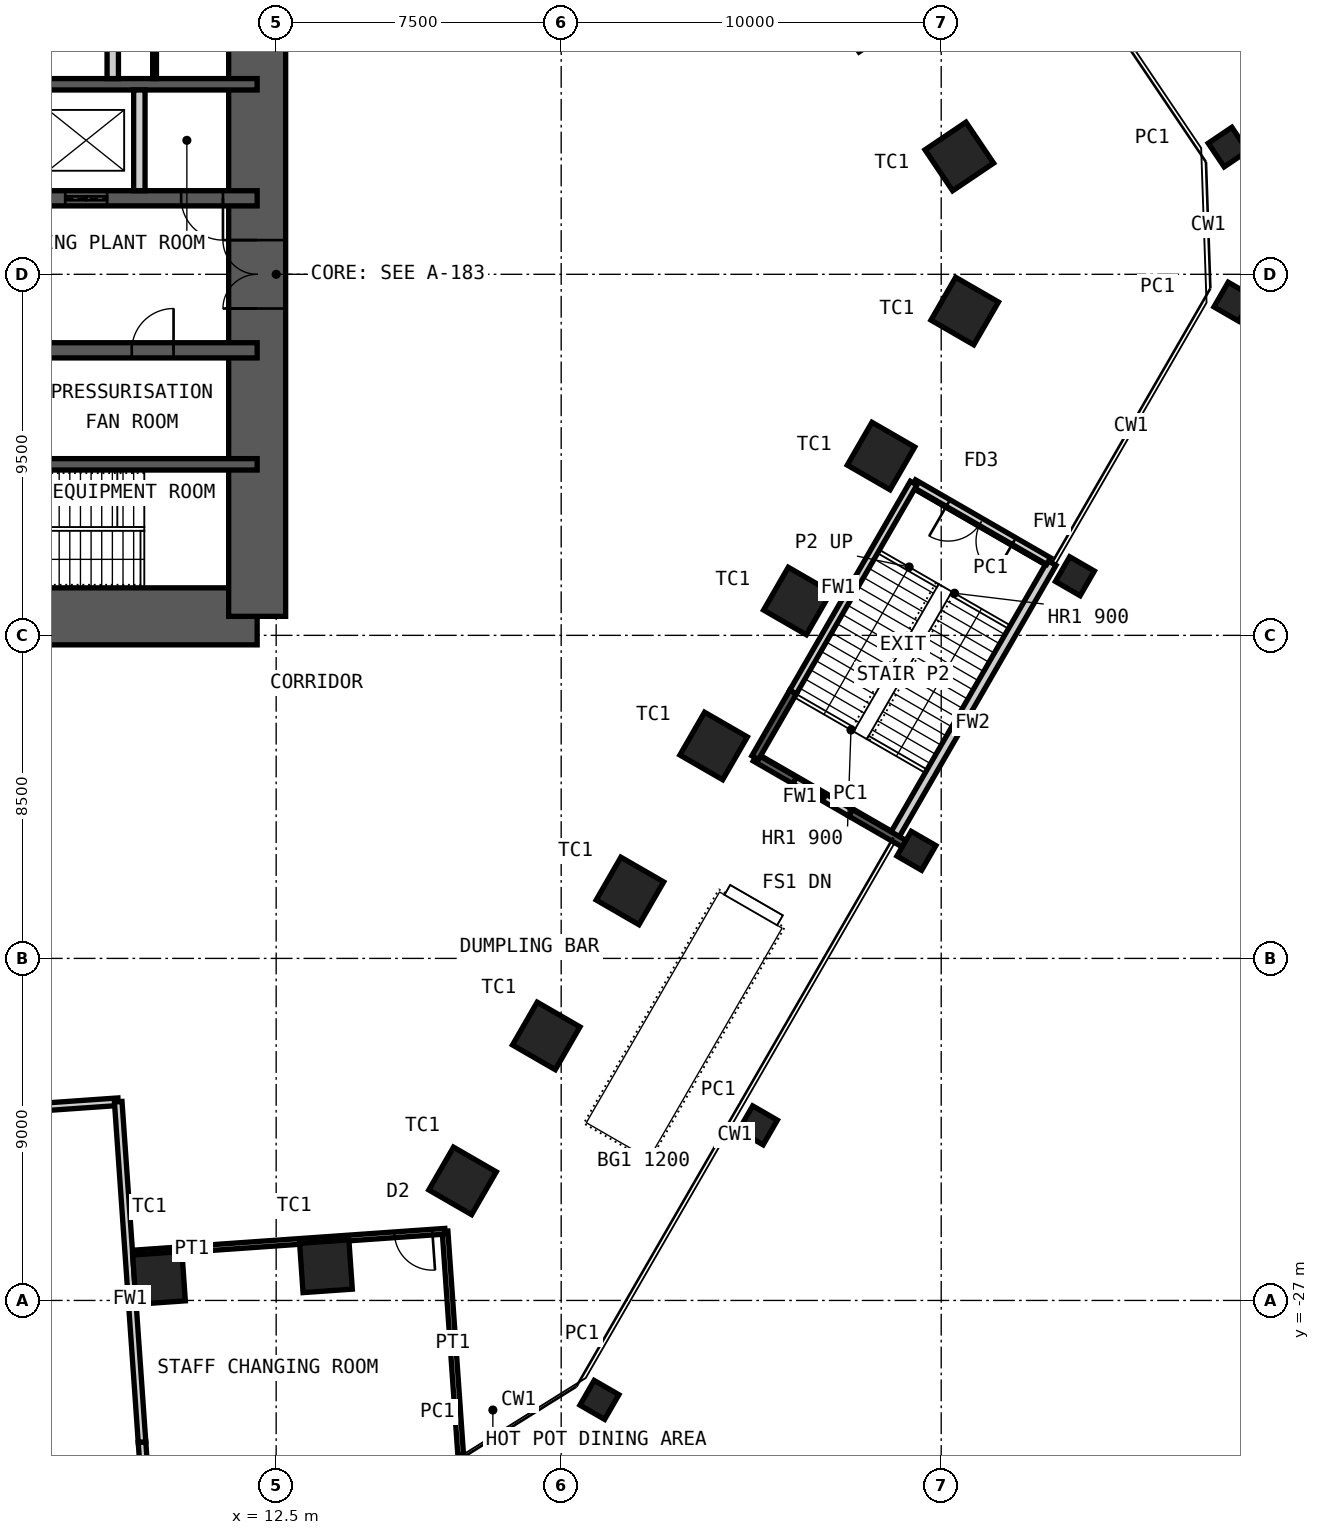
"""IFC4 building model, lengths in metres.
Left out: names, types, materials, properties, quantities, classifications, styles, units other than length and angle.
Written with IfcOpenShell. Run it as: python <this file> out.ifc"""

import sys

from ifc_helpers import new_model, si_unit, direction, frame, frame_2d, origin, origin_2d, place, context, subcontext, project, spatial, rectangle, hollow_rectangle, extrude, element, fill, save


model = new_model("IFC4")
c1 = context("Model", 3, precision=1e-05, world=origin(), true_north=direction((0.0, 1.0)))
c2 = subcontext(c1, "Body", "Model", "MODEL_VIEW")
j1 = project(units=[si_unit("LENGTHUNIT", "METRE"), si_unit("PLANEANGLEUNIT", "RADIAN")], contexts=[c1])
p1 = place(None, origin())
s1 = spatial("IfcSite", under=j1, at=p1, CompositionType="ELEMENT")
p2 = place(p1, origin())
s2 = spatial("IfcBuilding", under=s1, at=p2, CompositionType="ELEMENT")
p3 = place(p2, frame((0.0, 0.0, 6.0)))
s3 = spatial("IfcBuildingStorey", under=s2, at=p3, CompositionType="ELEMENT", Elevation=6.0)
for number, where, z_axis, x_axis in (
    (1, (28.013, 6.752, 0.0), (0.0, 0.0, 1.0), (-0.559, 0.829, 0.0)),
    (2, (30.476, 3.101, 0.0), (0.0, 0.0, 1.0), (-0.559, 0.829, 0.0)),
    (3, (30.618, -0.967, 0.0), (0.0, 0.0, 1.0), (0.5, 0.866, 0.0)),
    (4, (28.416, -4.782, 0.0), (0.0, 0.0, 1.0), (0.5, 0.866, 0.0)),
    (5, (26.214, -8.596, 0.0), (0.0, 0.0, 1.0), (0.5, 0.866, 0.0)),
    (6, (24.011, -12.411, 0.0), (0.0, 0.0, 1.0), (0.5, 0.866, 0.0)),
    (7, (21.809, -16.225, 0.0), (0.0, 0.0, 1.0), (0.5, 0.866, 0.0)),
    (8, (19.607, -20.04, 0.0), (0.0, 0.0, 1.0), (0.5, 0.866, 0.0)),
    (9, (17.405, -23.854, 0.0), (0.0, 0.0, 1.0), (0.5, 0.866, 0.0)),
    (10, (13.811, -26.1, 0.0), (0.0, 0.0, 1.0), (0.998, 0.07, 0.0)),
    (11, (9.417, -26.407, 0.0), (0.0, 0.0, 1.0), (0.998, 0.07, 0.0)),
):
    element("IfcColumn", number, at=place(p3, frame(where, z_axis=z_axis, x_axis=x_axis)), inside=s3, PredefinedType="COLUMN", context=c2, shape_type="SweptSolid", body=[
        extrude(hollow_rectangle(XDim=1.3, YDim=1.3, WallThickness=0.1, at=origin_2d()), origin(), (0.0, 0.0, 1.0), 6.0),
    ])
for number, where, z_axis, x_axis in (
    (12, (37.689, -0.72, 0.0), (0.0, 0.0, 1.0), (0.5, 0.866, 0.0)),
    (13, (33.518, -7.945, 0.0), (0.0, 0.0, 1.0), (0.5, 0.866, 0.0)),
    (14, (29.347, -15.169, 0.0), (0.0, 0.0, 1.0), (0.5, 0.866, 0.0)),
    (15, (25.177, -22.393, 0.0), (0.0, 0.0, 1.0), (0.5, 0.866, 0.0)),
    (16, (37.547, 3.348, 0.0), (0.0, 0.0, 1.0), (-0.559, 0.829, 0.0)),
    (17, (21.006, -29.617, 0.0), (0.0, 0.0, 1.0), (0.5, 0.866, 0.0)),
):
    element("IfcColumn", number, at=place(p3, frame(where, z_axis=z_axis, x_axis=x_axis)), inside=s3, PredefinedType="COLUMN", context=c2, shape_type="SweptSolid", body=[
        extrude(hollow_rectangle(XDim=0.75, YDim=0.75, WallThickness=0.036, at=origin_2d()), origin(), (0.0, 0.0, 1.0), 6.0),
    ])
p4 = place(p3, frame((-12.0, -9.0, 0.0), z_axis=(0.0, 0.0, 1.0), x_axis=(1.0, 0.0, 0.0)))
e18 = element("IfcWall", 18, at=p4, inside=s3, PredefinedType="SHEAR", context=c2, shape_type="SweptSolid", body=[
    extrude(rectangle(XDim=24.0, YDim=1.5, at=frame_2d((12.0, 0.0))), origin(), (0.0, 0.0, 1.0), 6.0),
])
p5 = place(p4, frame((1.35, 0.0, 0.0)))
e19 = element("IfcOpeningElement", 19, at=p5, cuts=e18, PredefinedType="OPENING", context=c2, shape_type="SweptSolid", body=[
    extrude(rectangle(XDim=1.0, YDim=2.1, at=frame_2d((0.5, 1.05))), frame((0.0, 0.76, 0.0), z_axis=(0.0, -1.0, 0.0), x_axis=(1.0, 0.0, 0.0)), (0.0, 0.0, 1.0), 1.52),
])
p6 = place(p4, frame((5.325, 0.0, 0.0)))
e20 = element("IfcOpeningElement", 20, at=p6, cuts=e18, PredefinedType="OPENING", context=c2, shape_type="SweptSolid", body=[
    extrude(rectangle(XDim=1.15, YDim=2.1, at=frame_2d((0.575, 1.05))), frame((0.0, 0.76, 0.0), z_axis=(0.0, -1.0, 0.0), x_axis=(1.0, 0.0, 0.0)), (0.0, 0.0, 1.0), 1.52),
])
p7 = place(p4, frame((12.6, 0.0, 0.0)))
e21 = element("IfcOpeningElement", 21, at=p7, cuts=e18, PredefinedType="OPENING", context=c2, shape_type="SweptSolid", body=[
    extrude(rectangle(XDim=1.0, YDim=2.1, at=frame_2d((0.5, 1.05))), frame((0.0, 0.76, 0.0), z_axis=(0.0, -1.0, 0.0), x_axis=(1.0, 0.0, 0.0)), (0.0, 0.0, 1.0), 1.52),
])
p8 = place(p3, frame((12.0, -9.0, 0.0), z_axis=(0.0, 0.0, 1.0), x_axis=(0.0, 1.0, 0.0)))
e22 = element("IfcWall", 22, at=p8, inside=s3, PredefinedType="SHEAR", context=c2, shape_type="SweptSolid", body=[
    extrude(rectangle(XDim=18.0, YDim=1.5, at=frame_2d((9.0, 0.0))), origin(), (0.0, 0.0, 1.0), 6.0),
])
p9 = place(p8, frame((8.1, 0.0, 0.0)))
e23 = element("IfcOpeningElement", 23, at=p9, cuts=e22, PredefinedType="OPENING", context=c2, shape_type="SweptSolid", body=[
    extrude(rectangle(XDim=1.8, YDim=2.1, at=frame_2d((0.9, 1.05))), frame((0.0, 0.76, 0.0), z_axis=(0.0, -1.0, 0.0), x_axis=(1.0, 0.0, 0.0)), (0.0, 0.0, 1.0), 1.52),
])
p10 = place(p3, frame((-12.0, 5.0, 0.0), z_axis=(0.0, 0.0, 1.0), x_axis=(1.0, 0.0, 0.0)))
e24 = element("IfcWall", 24, at=p10, inside=s3, PredefinedType="SHEAR", context=c2, shape_type="SweptSolid", body=[
    extrude(rectangle(XDim=24.0, YDim=0.3, at=frame_2d((12.0, 0.0))), origin(), (0.0, 0.0, 1.0), 6.0),
])
p11 = place(p3, frame((-12.0, 2.0, 0.0), z_axis=(0.0, 0.0, 1.0), x_axis=(1.0, 0.0, 0.0)))
e25 = element("IfcWall", 25, at=p11, inside=s3, PredefinedType="SHEAR", context=c2, shape_type="SweptSolid", body=[
    extrude(rectangle(XDim=24.0, YDim=0.4, at=frame_2d((12.0, 0.0))), origin(), (0.0, 0.0, 1.0), 6.0),
])
p12 = place(p11, frame((2.4, 0.0, 0.0)))
e26 = element("IfcOpeningElement", 26, at=p12, cuts=e25, PredefinedType="OPENING", context=c2, shape_type="SweptSolid", body=[
    extrude(rectangle(XDim=1.1, YDim=2.1, at=frame_2d((0.55, 1.05))), frame((0.0, 0.21, 0.0), z_axis=(0.0, -1.0, 0.0), x_axis=(1.0, 0.0, 0.0)), (0.0, 0.0, 1.0), 0.42),
])
p13 = place(p11, frame((22.0, 0.0, 0.0)))
e27 = element("IfcOpeningElement", 27, at=p13, cuts=e25, PredefinedType="OPENING", context=c2, shape_type="SweptSolid", body=[
    extrude(rectangle(XDim=1.1, YDim=2.1, at=frame_2d((0.55, 1.05))), frame((0.0, 0.21, 0.0), z_axis=(0.0, -1.0, 0.0), x_axis=(1.0, 0.0, 0.0)), (0.0, 0.0, 1.0), 0.42),
])
p14 = place(p11, frame((10.15, 0.0, 0.0)))
e28 = element("IfcOpeningElement", 28, at=p14, cuts=e25, PredefinedType="OPENING", context=c2, shape_type="SweptSolid", body=[
    extrude(rectangle(XDim=1.0, YDim=2.1, at=frame_2d((0.5, 1.05))), frame((0.0, 0.21, 0.0), z_axis=(0.0, -1.0, 0.0), x_axis=(1.0, 0.0, 0.0)), (0.0, 0.0, 1.0), 0.42),
])
p15 = place(p11, frame((6.7, 0.0, 0.0)))
e29 = element("IfcOpeningElement", 29, at=p15, cuts=e25, PredefinedType="OPENING", context=c2, shape_type="SweptSolid", body=[
    extrude(rectangle(XDim=1.4, YDim=2.4, at=frame_2d((0.7, 1.2))), frame((0.0, 0.21, 0.0), z_axis=(0.0, -1.0, 0.0), x_axis=(1.0, 0.0, 0.0)), (0.0, 0.0, 1.0), 0.42),
])
p16 = place(p11, frame((13.35, 0.0, 0.0)))
e30 = element("IfcOpeningElement", 30, at=p16, cuts=e25, PredefinedType="OPENING", context=c2, shape_type="SweptSolid", body=[
    extrude(rectangle(XDim=1.1, YDim=2.4, at=frame_2d((0.55, 1.2))), frame((0.0, 0.21, 0.0), z_axis=(0.0, -1.0, 0.0), x_axis=(1.0, 0.0, 0.0)), (0.0, 0.0, 1.0), 0.42),
])
p17 = place(p11, frame((16.15, 0.0, 0.0)))
e31 = element("IfcOpeningElement", 31, at=p17, cuts=e25, PredefinedType="OPENING", context=c2, shape_type="SweptSolid", body=[
    extrude(rectangle(XDim=1.1, YDim=2.4, at=frame_2d((0.55, 1.2))), frame((0.0, 0.21, 0.0), z_axis=(0.0, -1.0, 0.0), x_axis=(1.0, 0.0, 0.0)), (0.0, 0.0, 1.0), 0.42),
])
p18 = place(p11, frame((18.95, 0.0, 0.0)))
e32 = element("IfcOpeningElement", 32, at=p18, cuts=e25, PredefinedType="OPENING", context=c2, shape_type="SweptSolid", body=[
    extrude(rectangle(XDim=1.1, YDim=2.4, at=frame_2d((0.55, 1.2))), frame((0.0, 0.21, 0.0), z_axis=(0.0, -1.0, 0.0), x_axis=(1.0, 0.0, 0.0)), (0.0, 0.0, 1.0), 0.42),
])
p19 = place(p3, frame((-12.0, -2.0, 0.0), z_axis=(0.0, 0.0, 1.0), x_axis=(1.0, 0.0, 0.0)))
e33 = element("IfcWall", 33, at=p19, inside=s3, PredefinedType="SHEAR", context=c2, shape_type="SweptSolid", body=[
    extrude(rectangle(XDim=24.0, YDim=0.4, at=frame_2d((12.0, 0.0))), origin(), (0.0, 0.0, 1.0), 6.0),
])
p20 = place(p19, frame((1.1, 0.0, 0.0)))
e34 = element("IfcOpeningElement", 34, at=p20, cuts=e33, PredefinedType="OPENING", context=c2, shape_type="SweptSolid", body=[
    extrude(rectangle(XDim=1.1, YDim=2.1, at=frame_2d((0.55, 1.05))), frame((0.0, 0.21, 0.0), z_axis=(0.0, -1.0, 0.0), x_axis=(1.0, 0.0, 0.0)), (0.0, 0.0, 1.0), 0.42),
])
p21 = place(p19, frame((13.55, 0.0, 0.0)))
e35 = element("IfcOpeningElement", 35, at=p21, cuts=e33, PredefinedType="OPENING", context=c2, shape_type="SweptSolid", body=[
    extrude(rectangle(XDim=1.1, YDim=2.1, at=frame_2d((0.55, 1.05))), frame((0.0, 0.21, 0.0), z_axis=(0.0, -1.0, 0.0), x_axis=(1.0, 0.0, 0.0)), (0.0, 0.0, 1.0), 0.42),
])
p22 = place(p19, frame((20.7, 0.0, 0.0)))
e36 = element("IfcOpeningElement", 36, at=p22, cuts=e33, PredefinedType="OPENING", context=c2, shape_type="SweptSolid", body=[
    extrude(rectangle(XDim=1.1, YDim=2.1, at=frame_2d((0.55, 1.05))), frame((0.0, 0.21, 0.0), z_axis=(0.0, -1.0, 0.0), x_axis=(1.0, 0.0, 0.0)), (0.0, 0.0, 1.0), 0.42),
])
p23 = place(p3, frame((-12.0, -5.0, 0.0), z_axis=(0.0, 0.0, 1.0), x_axis=(1.0, 0.0, 0.0)))
e37 = element("IfcWall", 37, at=p23, inside=s3, PredefinedType="SHEAR", context=c2, shape_type="SweptSolid", body=[
    extrude(rectangle(XDim=24.0, YDim=0.3, at=frame_2d((12.0, 0.0))), origin(), (0.0, 0.0, 1.0), 6.0),
])
p24 = place(p3, frame((8.2, 5.15, 0.0), z_axis=(0.0, 0.0, 1.0), x_axis=(0.0, 1.0, 0.0)))
e38 = element("IfcWall", 38, at=p24, inside=s3, PredefinedType="PARTITIONING", context=c2, shape_type="SweptSolid", body=[
    extrude(rectangle(XDim=3.85, YDim=0.3, at=frame_2d((1.925, 0.0))), origin(), (0.0, 0.0, 1.0), 5.78),
])
p25 = place(p3, frame((8.9, 2.2, 0.0), z_axis=(0.0, 0.0, 1.0), x_axis=(0.0, 1.0, 0.0)))
e39 = element("IfcWall", 39, at=p25, inside=s3, PredefinedType="PARTITIONING", context=c2, shape_type="SweptSolid", body=[
    extrude(rectangle(XDim=2.65, YDim=0.3, at=frame_2d((1.325, 0.0))), origin(), (0.0, 0.0, 1.0), 5.78),
])
p26 = place(p3, frame((32.912, -7.595, 0.0), z_axis=(0.0, 0.0, 1.0), x_axis=(-0.500004511595, -0.866022798998, 0.0)))
e40 = element("IfcWall", 40, at=p26, inside=s3, PredefinedType="SOLIDWALL", context=c2, shape_type="SweptSolid", body=[
    extrude(rectangle(XDim=8.342, YDim=0.25, at=frame_2d((4.171, 0.0))), origin(), (0.0, 0.0, 1.0), 5.75),
])
p27 = place(p3, frame((9.3, 5.15, 0.0), z_axis=(0.0, 0.0, 1.0), x_axis=(0.0, 1.0, 0.0)))
e41 = element("IfcWall", 41, at=p27, inside=s3, PredefinedType="PARTITIONING", context=c2, shape_type="SweptSolid", body=[
    extrude(rectangle(XDim=1.5, YDim=0.1, at=frame_2d((0.75, 0.0))), origin(), (0.0, 0.0, 1.0), 2.1),
])
p28 = place(p3, frame((9.034, -31.647, 0.0), z_axis=(0.0, 0.0, 1.0), x_axis=(-0.069837025026, 0.997558414297, 0.0)))
e42 = element("IfcWall", 42, at=p28, inside=s3, PredefinedType="PARTITIONING", context=c2, shape_type="SweptSolid", body=[
    extrude(rectangle(XDim=0.923, YDim=0.2, at=frame_2d((0.461, 0.0))), origin(), (0.0, 0.0, 1.0), 4.65),
])
p29 = place(p3, frame((8.344, -21.771, 0.0), z_axis=(0.0, 0.0, 1.0), x_axis=(-0.997563959397, -0.069757773133, 0.0)))
e43 = element("IfcWall", 43, at=p29, inside=s3, PredefinedType="PARTITIONING", context=c2, shape_type="SweptSolid", body=[
    extrude(rectangle(XDim=16.684, YDim=0.2, at=frame_2d((8.342, 0.0))), origin(), (0.0, 0.0, 1.0), 5.75),
])
p30 = place(p29, frame((7.342, 0.0, 0.0)))
e44 = element("IfcOpeningElement", 44, at=p30, cuts=e43, PredefinedType="OPENING", context=c2, shape_type="SweptSolid", body=[
    extrude(rectangle(XDim=2.0, YDim=2.4, at=frame_2d((1.0, 1.2))), frame((0.0, 0.11, 0.0), z_axis=(0.0, -1.0, 0.0), x_axis=(1.0, 0.0, 0.0)), (0.0, 0.0, 1.0), 0.22),
])
p31 = place(p3, frame((17.356, -31.065, 0.0), z_axis=(0.0, 0.0, 1.0), x_axis=(-0.069767771051, 0.997563260211, 0.0)))
e45 = element("IfcWall", 45, at=p31, inside=s3, PredefinedType="PARTITIONING", context=c2, shape_type="SweptSolid", body=[
    extrude(rectangle(XDim=5.9, YDim=0.15, at=frame_2d((2.95, 0.0))), origin(), (0.0, 0.0, 1.0), 5.75),
])
p32 = place(p3, frame((16.944, -25.179, 0.0), z_axis=(0.0, 0.0, 1.0), x_axis=(-0.997564977604, -0.069743210844, 0.0)))
e46 = element("IfcWall", 46, at=p32, inside=s3, PredefinedType="PARTITIONING", context=c2, shape_type="SweptSolid", body=[
    extrude(rectangle(XDim=8.342, YDim=0.15, at=frame_2d((4.171, 0.0))), origin(), (0.0, 0.0, 1.0), 5.75),
])
p33 = place(p32, frame((0.334, 0.0, 0.0)))
e47 = element("IfcOpeningElement", 47, at=p33, cuts=e46, PredefinedType="OPENING", context=c2, shape_type="SweptSolid", body=[
    extrude(rectangle(XDim=1.0, YDim=2.4, at=frame_2d((0.5, 1.2))), frame((0.0, 0.085, 0.0), z_axis=(0.0, -1.0, 0.0), x_axis=(1.0, 0.0, 0.0)), (0.0, 0.0, 1.0), 0.17),
])
p34 = place(p3, frame((32.825, -7.545, 0.0), z_axis=(0.0, 0.0, 1.0), x_axis=(-0.8660249478, 0.500000789788, 0.0)))
e48 = element("IfcWall", 48, at=p34, inside=s3, PredefinedType="PARTITIONING", context=c2, shape_type="SweptSolid", body=[
    extrude(rectangle(XDim=4.1, YDim=0.2, at=frame_2d((2.05, 0.0))), origin(), (0.0, 0.0, 1.0), 5.75),
])
p35 = place(p34, frame((1.05, 0.0, 0.0)))
e49 = element("IfcOpeningElement", 49, at=p35, cuts=e48, PredefinedType="OPENING", context=c2, shape_type="SweptSolid", body=[
    extrude(rectangle(XDim=2.0, YDim=2.4, at=frame_2d((1.0, 1.2))), frame((0.0, 0.11, 0.0), z_axis=(0.0, -1.0, 0.0), x_axis=(1.0, 0.0, 0.0)), (0.0, 0.0, 1.0), 0.22),
])
p36 = place(p3, frame((29.023, -14.981, 0.0), z_axis=(0.0, 0.0, 1.0), x_axis=(-0.866015446554, 0.500017246033, 0.0)))
e50 = element("IfcWall", 50, at=p36, inside=s3, PredefinedType="PARTITIONING", context=c2, shape_type="SweptSolid", body=[
    extrude(rectangle(XDim=1.625, YDim=0.2, at=frame_2d((0.812, 0.0))), origin(), (0.0, 0.0, 1.0), 5.75),
])
p37 = place(p3, frame((29.275, -5.495, 0.0), z_axis=(0.0, 0.0, 1.0), x_axis=(-0.499976503915, -0.866038968831, 0.0)))
e51 = element("IfcWall", 51, at=p37, inside=s3, PredefinedType="PARTITIONING", context=c2, shape_type="SweptSolid", body=[
    extrude(rectangle(XDim=6.35, YDim=0.2, at=frame_2d((3.175, 0.0))), origin(), (0.0, 0.0, 1.0), 5.75),
])
p38 = place(p3, frame((27.615, -14.169, 0.0), z_axis=(0.0, 0.0, 1.0), x_axis=(-0.866087547558, 0.499892348375, 0.0)))
e52 = element("IfcWall", 52, at=p38, inside=s3, PredefinedType="PARTITIONING", context=c2, shape_type="SweptSolid", body=[
    extrude(rectangle(XDim=1.7, YDim=0.2, at=frame_2d((0.85, 0.0))), origin(), (0.0, 0.0, 1.0), 5.75),
])
p39 = place(p3, frame((26.143, -13.319, 0.0), z_axis=(0.0, 0.0, 1.0), x_axis=(-0.865955154139, 0.50012165622, 0.0)))
e53 = element("IfcWall", 53, at=p39, inside=s3, PredefinedType="PARTITIONING", context=c2, shape_type="SweptSolid", body=[
    extrude(rectangle(XDim=1.2, YDim=0.2, at=frame_2d((0.6, 0.0))), origin(), (0.0, 0.0, 1.0), 5.75),
])
p40 = place(p3, frame((26.1, -10.994, 0.0), z_axis=(0.0, 0.0, 1.0), x_axis=(-0.500001870701, -0.866024323732, 0.0)))
e54 = element("IfcWall", 54, at=p40, inside=s3, PredefinedType="PARTITIONING", context=c2, shape_type="SweptSolid", body=[
    extrude(rectangle(XDim=1.992, YDim=0.2, at=frame_2d((0.996, 0.0))), origin(), (0.0, 0.0, 1.0), 5.75),
])
p41 = place(p3, frame((8.97, -30.726, 0.0), z_axis=(0.0, 0.0, 1.0), x_axis=(-0.069729805766, 0.997565914708, 0.0)))
e55 = element("IfcWall", 55, at=p41, inside=s3, PredefinedType="PARTITIONING", context=c2, shape_type="SweptSolid", body=[
    extrude(rectangle(XDim=8.977, YDim=0.2, at=frame_2d((4.489, 0.0))), origin(), (0.0, 0.0, 1.0), 5.75),
])
p42 = place(p13, origin())
e56 = element("IfcDoor", 56, at=p42, inside=s3, OperationType="SINGLE_SWING_RIGHT", PredefinedType="DOOR", context=c2, shape_type="SweptSolid", body=[
    extrude(rectangle(XDim=1.1, YDim=2.1, at=frame_2d((0.55, 1.05))), frame((0.0, 0.025, 0.0), z_axis=(0.0, -1.0, 0.0), x_axis=(1.0, 0.0, 0.0)), (0.0, 0.0, 1.0), 0.05),
])
fill(e27, e56)
p43 = place(p22, origin())
e57 = element("IfcDoor", 57, at=p43, inside=s3, OperationType="SINGLE_SWING_LEFT", PredefinedType="DOOR", context=c2, shape_type="SweptSolid", body=[
    extrude(rectangle(XDim=1.1, YDim=2.1, at=frame_2d((0.55, 1.05))), frame((0.0, 0.025, 0.0), z_axis=(0.0, -1.0, 0.0), x_axis=(1.0, 0.0, 0.0)), (0.0, 0.0, 1.0), 0.05),
])
fill(e36, e57)
p44 = place(p9, origin())
e58 = element("IfcDoor", 58, at=p44, inside=s3, OperationType="DOUBLE_DOOR_DOUBLE_SWING", PredefinedType="DOOR", context=c2, shape_type="SweptSolid", body=[
    extrude(rectangle(XDim=1.8, YDim=2.1, at=frame_2d((0.9, 1.05))), frame((0.0, 0.025, 0.0), z_axis=(0.0, -1.0, 0.0), x_axis=(1.0, 0.0, 0.0)), (0.0, 0.0, 1.0), 0.05),
])
fill(e23, e58)
p45 = place(p18, origin())
e59 = element("IfcDoor", 59, at=p45, inside=s3, OperationType="DOUBLE_DOOR_SLIDING", PredefinedType="DOOR", context=c2, shape_type="SweptSolid", body=[
    extrude(rectangle(XDim=1.1, YDim=2.4, at=frame_2d((0.55, 1.2))), frame((0.0, 0.025, 0.0), z_axis=(0.0, -1.0, 0.0), x_axis=(1.0, 0.0, 0.0)), (0.0, 0.0, 1.0), 0.05),
])
fill(e32, e59)
p46 = place(p33, origin())
e60 = element("IfcDoor", 60, at=p46, inside=s3, OperationType="SINGLE_SWING_RIGHT", PredefinedType="DOOR", context=c2, shape_type="SweptSolid", body=[
    extrude(rectangle(XDim=1.0, YDim=2.4, at=frame_2d((0.5, 1.2))), frame((0.0, 0.025, 0.0), z_axis=(0.0, -1.0, 0.0), x_axis=(1.0, 0.0, 0.0)), (0.0, 0.0, 1.0), 0.05),
])
fill(e47, e60)
p47 = place(p35, origin())
e61 = element("IfcDoor", 61, at=p47, inside=s3, OperationType="DOUBLE_DOOR_DOUBLE_SWING", PredefinedType="DOOR", context=c2, shape_type="SweptSolid", body=[
    extrude(rectangle(XDim=2.0, YDim=2.4, at=frame_2d((1.0, 1.2))), frame((0.0, 0.025, 0.0), z_axis=(0.0, -1.0, 0.0), x_axis=(1.0, 0.0, 0.0)), (0.0, 0.0, 1.0), 0.05),
])
fill(e49, e61)
save(model, sys.argv[1])
